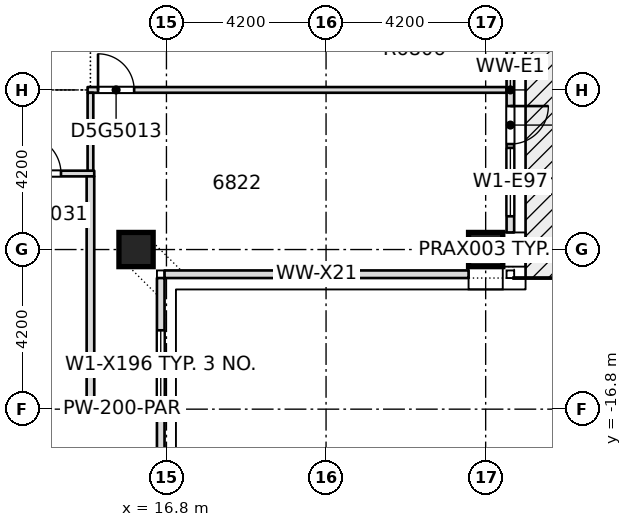
"""IFC4 building model, lengths in metres.
Left out: names, types, materials, properties, quantities, classifications, styles, units other than length and angle.
Written with IfcOpenShell. Run it as: python <this file> out.ifc"""

import sys

from ifc_helpers import new_model, si_unit, direction, frame, frame_2d, origin, origin_2d, place, context, subcontext, project, spatial, rectangle, extrude, element, fill, save


model = new_model("IFC4")
c1 = context("Model", 3, precision=1e-05, world=origin(), true_north=direction((0.0, 1.0)))
c2 = subcontext(c1, "Body", "Model", "MODEL_VIEW")
j1 = project(units=[si_unit("LENGTHUNIT", "METRE"), si_unit("PLANEANGLEUNIT", "RADIAN")], contexts=[c1])
p1 = place(None, origin())
s1 = spatial("IfcSite", under=j1, at=p1, CompositionType="ELEMENT")
p2 = place(p1, origin())
s2 = spatial("IfcBuilding", under=s1, at=p2, CompositionType="ELEMENT")
p3 = place(p2, frame((0.0, 0.0, 257.95)))
s3 = spatial("IfcBuildingStorey", under=s2, at=p3, CompositionType="ELEMENT", Elevation=257.95)
for number, where, z_axis, x_axis in (
    (1, (16.0, -12.6, -0.4), (0.0, 0.0, 1.0), (1.0, 0.0, 0.0)),
    (2, (25.2, -12.6, -0.4), (0.0, 0.0, 1.0), (1.0, 0.0, 0.0)),
):
    element("IfcColumn", number, at=place(p3, frame(where, z_axis=z_axis, x_axis=x_axis)), inside=s3, PredefinedType="COLUMN", context=c2, shape_type="SweptSolid", body=[
        extrude(rectangle(XDim=0.9, YDim=0.9, at=origin_2d()), origin(), (0.0, 0.0, 1.0), 3.45),
    ])
p4 = place(p3, frame((14.702, -16.8, 0.0), z_axis=(0.0, 0.0, 1.0), x_axis=(1.0, 0.0, 0.0)))
e3 = element("IfcWall", 3, at=p4, inside=s3, PredefinedType="PARTITIONING", context=c2, shape_type="SweptSolid", body=[
    extrude(rectangle(XDim=1.848, YDim=0.2, at=frame_2d((0.924, 0.0))), origin(), (0.0, 0.0, 1.0), 3.05),
])
p5 = place(p3, frame((4.5, -10.6, 0.0), z_axis=(0.0, 0.0, 1.0), x_axis=(1.0, 0.0, 0.0)))
e4 = element("IfcWall", 4, at=p5, inside=s3, PredefinedType="PARTITIONING", context=c2, shape_type="SweptSolid", body=[
    extrude(rectangle(XDim=10.4, YDim=0.15, at=frame_2d((5.2, 0.0))), origin(), (0.0, 0.0, 1.0), 3.05),
])
p6 = place(p5, frame((1.575, 0.0, 0.0)))
e5 = element("IfcOpeningElement", 5, at=p6, cuts=e4, PredefinedType="OPENING", context=c2, shape_type="SweptSolid", body=[
    extrude(rectangle(XDim=0.95, YDim=2.1, at=frame_2d((0.475, 1.05))), frame((0.0, 0.085, 0.0), z_axis=(0.0, -1.0, 0.0), x_axis=(1.0, 0.0, 0.0)), (0.0, 0.0, 1.0), 0.17),
])
p7 = place(p5, frame((5.35, 0.0, 0.0)))
e6 = element("IfcOpeningElement", 6, at=p7, cuts=e4, PredefinedType="OPENING", context=c2, shape_type="SweptSolid", body=[
    extrude(rectangle(XDim=1.1, YDim=2.1, at=frame_2d((0.55, 1.05))), frame((0.0, 0.085, 0.0), z_axis=(0.0, -1.0, 0.0), x_axis=(1.0, 0.0, 0.0)), (0.0, 0.0, 1.0), 0.17),
])
p8 = place(p5, frame((8.525, 0.0, 0.0)))
e7 = element("IfcOpeningElement", 7, at=p8, cuts=e4, PredefinedType="OPENING", context=c2, shape_type="SweptSolid", body=[
    extrude(rectangle(XDim=1.0, YDim=2.1, at=frame_2d((0.5, 1.05))), frame((0.0, 0.085, 0.0), z_axis=(0.0, -1.0, 0.0), x_axis=(1.0, 0.0, 0.0)), (0.0, 0.0, 1.0), 0.17),
])
p9 = place(p3, frame((14.725, -8.4, 0.0), z_axis=(0.0, 0.0, 1.0), x_axis=(1.0, 0.0, 0.0)))
e8 = element("IfcWall", 8, at=p9, inside=s3, PredefinedType="PARTITIONING", context=c2, shape_type="SweptSolid", body=[
    extrude(rectangle(XDim=11.025, YDim=0.15, at=frame_2d((5.512, 0.0))), origin(), (0.0, 0.0, 1.0), 3.05),
])
p10 = place(p9, frame((0.275, 0.0, 0.0)))
e9 = element("IfcOpeningElement", 9, at=p10, cuts=e8, PredefinedType="OPENING", context=c2, shape_type="SweptSolid", body=[
    extrude(rectangle(XDim=0.95, YDim=2.1, at=frame_2d((0.475, 1.05))), frame((0.0, 0.085, 0.0), z_axis=(0.0, -1.0, 0.0), x_axis=(1.0, 0.0, 0.0)), (0.0, 0.0, 1.0), 0.17),
])
p11 = place(p3, frame((14.8, -16.698, 0.0), z_axis=(0.0, 0.0, 1.0), x_axis=(0.0, 1.0, 0.0)))
e10 = element("IfcWall", 10, at=p11, inside=s3, PredefinedType="PARTITIONING", context=c2, shape_type="SweptSolid", body=[
    extrude(rectangle(XDim=6.023, YDim=0.2, at=frame_2d((3.011, 0.0))), origin(), (0.0, 0.0, 1.0), 3.05),
])
p12 = place(p3, frame((14.8, -10.525, 0.0), z_axis=(0.0, 0.0, 1.0), x_axis=(0.0, 1.0, 0.0)))
e11 = element("IfcWall", 11, at=p12, inside=s3, PredefinedType="PARTITIONING", context=c2, shape_type="SweptSolid", body=[
    extrude(rectangle(XDim=2.05, YDim=0.15, at=frame_2d((1.025, 0.0))), origin(), (0.0, 0.0, 1.0), 3.05),
])
p13 = place(p3, frame((16.65, -20.55, 0.0), z_axis=(0.0, 0.0, 1.0), x_axis=(0.0, 1.0, 0.0)))
e12 = element("IfcWall", 12, at=p13, inside=s3, PredefinedType="STANDARD", context=c2, shape_type="SweptSolid", body=[
    extrude(rectangle(XDim=7.2, YDim=0.2, at=frame_2d((3.6, 0.0))), origin(), (0.0, 0.0, 1.0), 3.05),
])
p14 = place(p13, frame((0.425, 0.0, 0.2)))
e13 = element("IfcOpeningElement", 13, at=p14, cuts=e12, PredefinedType="OPENING", context=c2, shape_type="SweptSolid", body=[
    extrude(rectangle(XDim=1.8, YDim=2.65, at=frame_2d((0.9, 1.325))), frame((0.0, 0.11, 0.0), z_axis=(0.0, -1.0, 0.0), x_axis=(1.0, 0.0, 0.0)), (0.0, 0.0, 1.0), 0.22),
])
p15 = place(p13, frame((4.025, 0.0, 0.2)))
e14 = element("IfcOpeningElement", 14, at=p15, cuts=e12, PredefinedType="OPENING", context=c2, shape_type="SweptSolid", body=[
    extrude(rectangle(XDim=1.8, YDim=2.65, at=frame_2d((0.9, 1.325))), frame((0.0, 0.11, 0.0), z_axis=(0.0, -1.0, 0.0), x_axis=(1.0, 0.0, 0.0)), (0.0, 0.0, 1.0), 0.22),
])
p16 = place(p3, frame((16.75, -13.25, 0.0), z_axis=(0.0, 0.0, 1.0), x_axis=(1.0, 0.0, 0.0)))
e15 = element("IfcWall", 15, at=p16, inside=s3, PredefinedType="STANDARD", context=c2, shape_type="SweptSolid", body=[
    extrude(rectangle(XDim=8.0, YDim=0.2, at=frame_2d((4.0, 0.0))), origin(), (0.0, 0.0, 1.0), 3.05),
])
p17 = place(p3, frame((25.85, -12.15, 0.0), z_axis=(0.0, 0.0, 1.0), x_axis=(0.0, 1.0, 0.0)))
e16 = element("IfcWall", 16, at=p17, inside=s3, PredefinedType="STANDARD", context=c2, shape_type="SweptSolid", body=[
    extrude(rectangle(XDim=7.5, YDim=0.2, at=frame_2d((3.75, 0.0))), origin(), (0.0, 0.0, 1.0), 3.05),
])
p18 = place(p17, frame((0.425, 0.0, 0.2)))
e17 = element("IfcOpeningElement", 17, at=p18, cuts=e16, PredefinedType="OPENING", context=c2, shape_type="SweptSolid", body=[
    extrude(rectangle(XDim=1.8, YDim=2.65, at=frame_2d((0.9, 1.325))), frame((0.0, 0.11, 0.0), z_axis=(0.0, -1.0, 0.0), x_axis=(1.0, 0.0, 0.0)), (0.0, 0.0, 1.0), 0.22),
])
p19 = place(p17, frame((2.325, 0.0, 0.0)))
e18 = element("IfcOpeningElement", 18, at=p19, cuts=e16, PredefinedType="OPENING", context=c2, shape_type="SweptSolid", body=[
    extrude(rectangle(XDim=1.0, YDim=2.4, at=frame_2d((0.5, 1.2))), frame((0.0, 0.11, 0.0), z_axis=(0.0, -1.0, 0.0), x_axis=(1.0, 0.0, 0.0)), (0.0, 0.0, 1.0), 0.22),
])
p20 = place(p17, frame((6.075, 0.0, 0.0)))
e19 = element("IfcOpeningElement", 19, at=p20, cuts=e16, PredefinedType="OPENING", context=c2, shape_type="SweptSolid", body=[
    extrude(rectangle(XDim=1.0, YDim=2.4, at=frame_2d((0.5, 1.2))), frame((0.0, 0.11, 0.0), z_axis=(0.0, -1.0, 0.0), x_axis=(1.0, 0.0, 0.0)), (0.0, 0.0, 1.0), 0.22),
])
p21 = place(p10, origin())
e20 = element("IfcDoor", 20, at=p21, inside=s3, OperationType="SINGLE_SWING_RIGHT", PredefinedType="DOOR", context=c2, shape_type="SweptSolid", body=[
    extrude(rectangle(XDim=0.95, YDim=2.1, at=frame_2d((0.475, 1.05))), frame((0.0, 0.025, 0.0), z_axis=(0.0, -1.0, 0.0), x_axis=(1.0, 0.0, 0.0)), (0.0, 0.0, 1.0), 0.05),
])
fill(e9, e20)
p22 = place(p8, origin())
e21 = element("IfcDoor", 21, at=p22, inside=s3, OperationType="SINGLE_SWING_LEFT", PredefinedType="DOOR", context=c2, shape_type="SweptSolid", body=[
    extrude(rectangle(XDim=1.0, YDim=2.1, at=frame_2d((0.5, 1.05))), frame((0.0, 0.025, 0.0), z_axis=(0.0, -1.0, 0.0), x_axis=(1.0, 0.0, 0.0)), (0.0, 0.0, 1.0), 0.05),
])
fill(e7, e21)
p23 = place(p15, origin())
e22 = element("IfcWindow", 22, at=p23, inside=s3, PartitioningType="SINGLE_PANEL", PredefinedType="WINDOW", context=c2, shape_type="SweptSolid", body=[
    extrude(rectangle(XDim=1.8, YDim=2.65, at=frame_2d((0.9, 1.325))), frame((0.0, 0.03, 0.0), z_axis=(0.0, -1.0, 0.0), x_axis=(1.0, 0.0, 0.0)), (0.0, 0.0, 1.0), 0.06),
])
fill(e14, e22)
p24 = place(p18, origin())
e23 = element("IfcWindow", 23, at=p24, inside=s3, PartitioningType="SINGLE_PANEL", PredefinedType="WINDOW", context=c2, shape_type="SweptSolid", body=[
    extrude(rectangle(XDim=1.8, YDim=2.65, at=frame_2d((0.9, 1.325))), frame((0.0, 0.03, 0.0), z_axis=(0.0, -1.0, 0.0), x_axis=(1.0, 0.0, 0.0)), (0.0, 0.0, 1.0), 0.06),
])
fill(e17, e23)
p25 = place(p19, origin())
e24 = element("IfcDoor", 24, at=p25, inside=s3, OperationType="SINGLE_SWING_LEFT", PredefinedType="DOOR", context=c2, shape_type="SweptSolid", body=[
    extrude(rectangle(XDim=1.0, YDim=2.4, at=frame_2d((0.5, 1.2))), frame((0.0, 0.025, 0.0), z_axis=(0.0, -1.0, 0.0), x_axis=(1.0, 0.0, 0.0)), (0.0, 0.0, 1.0), 0.05),
])
fill(e18, e24)
save(model, sys.argv[1])
